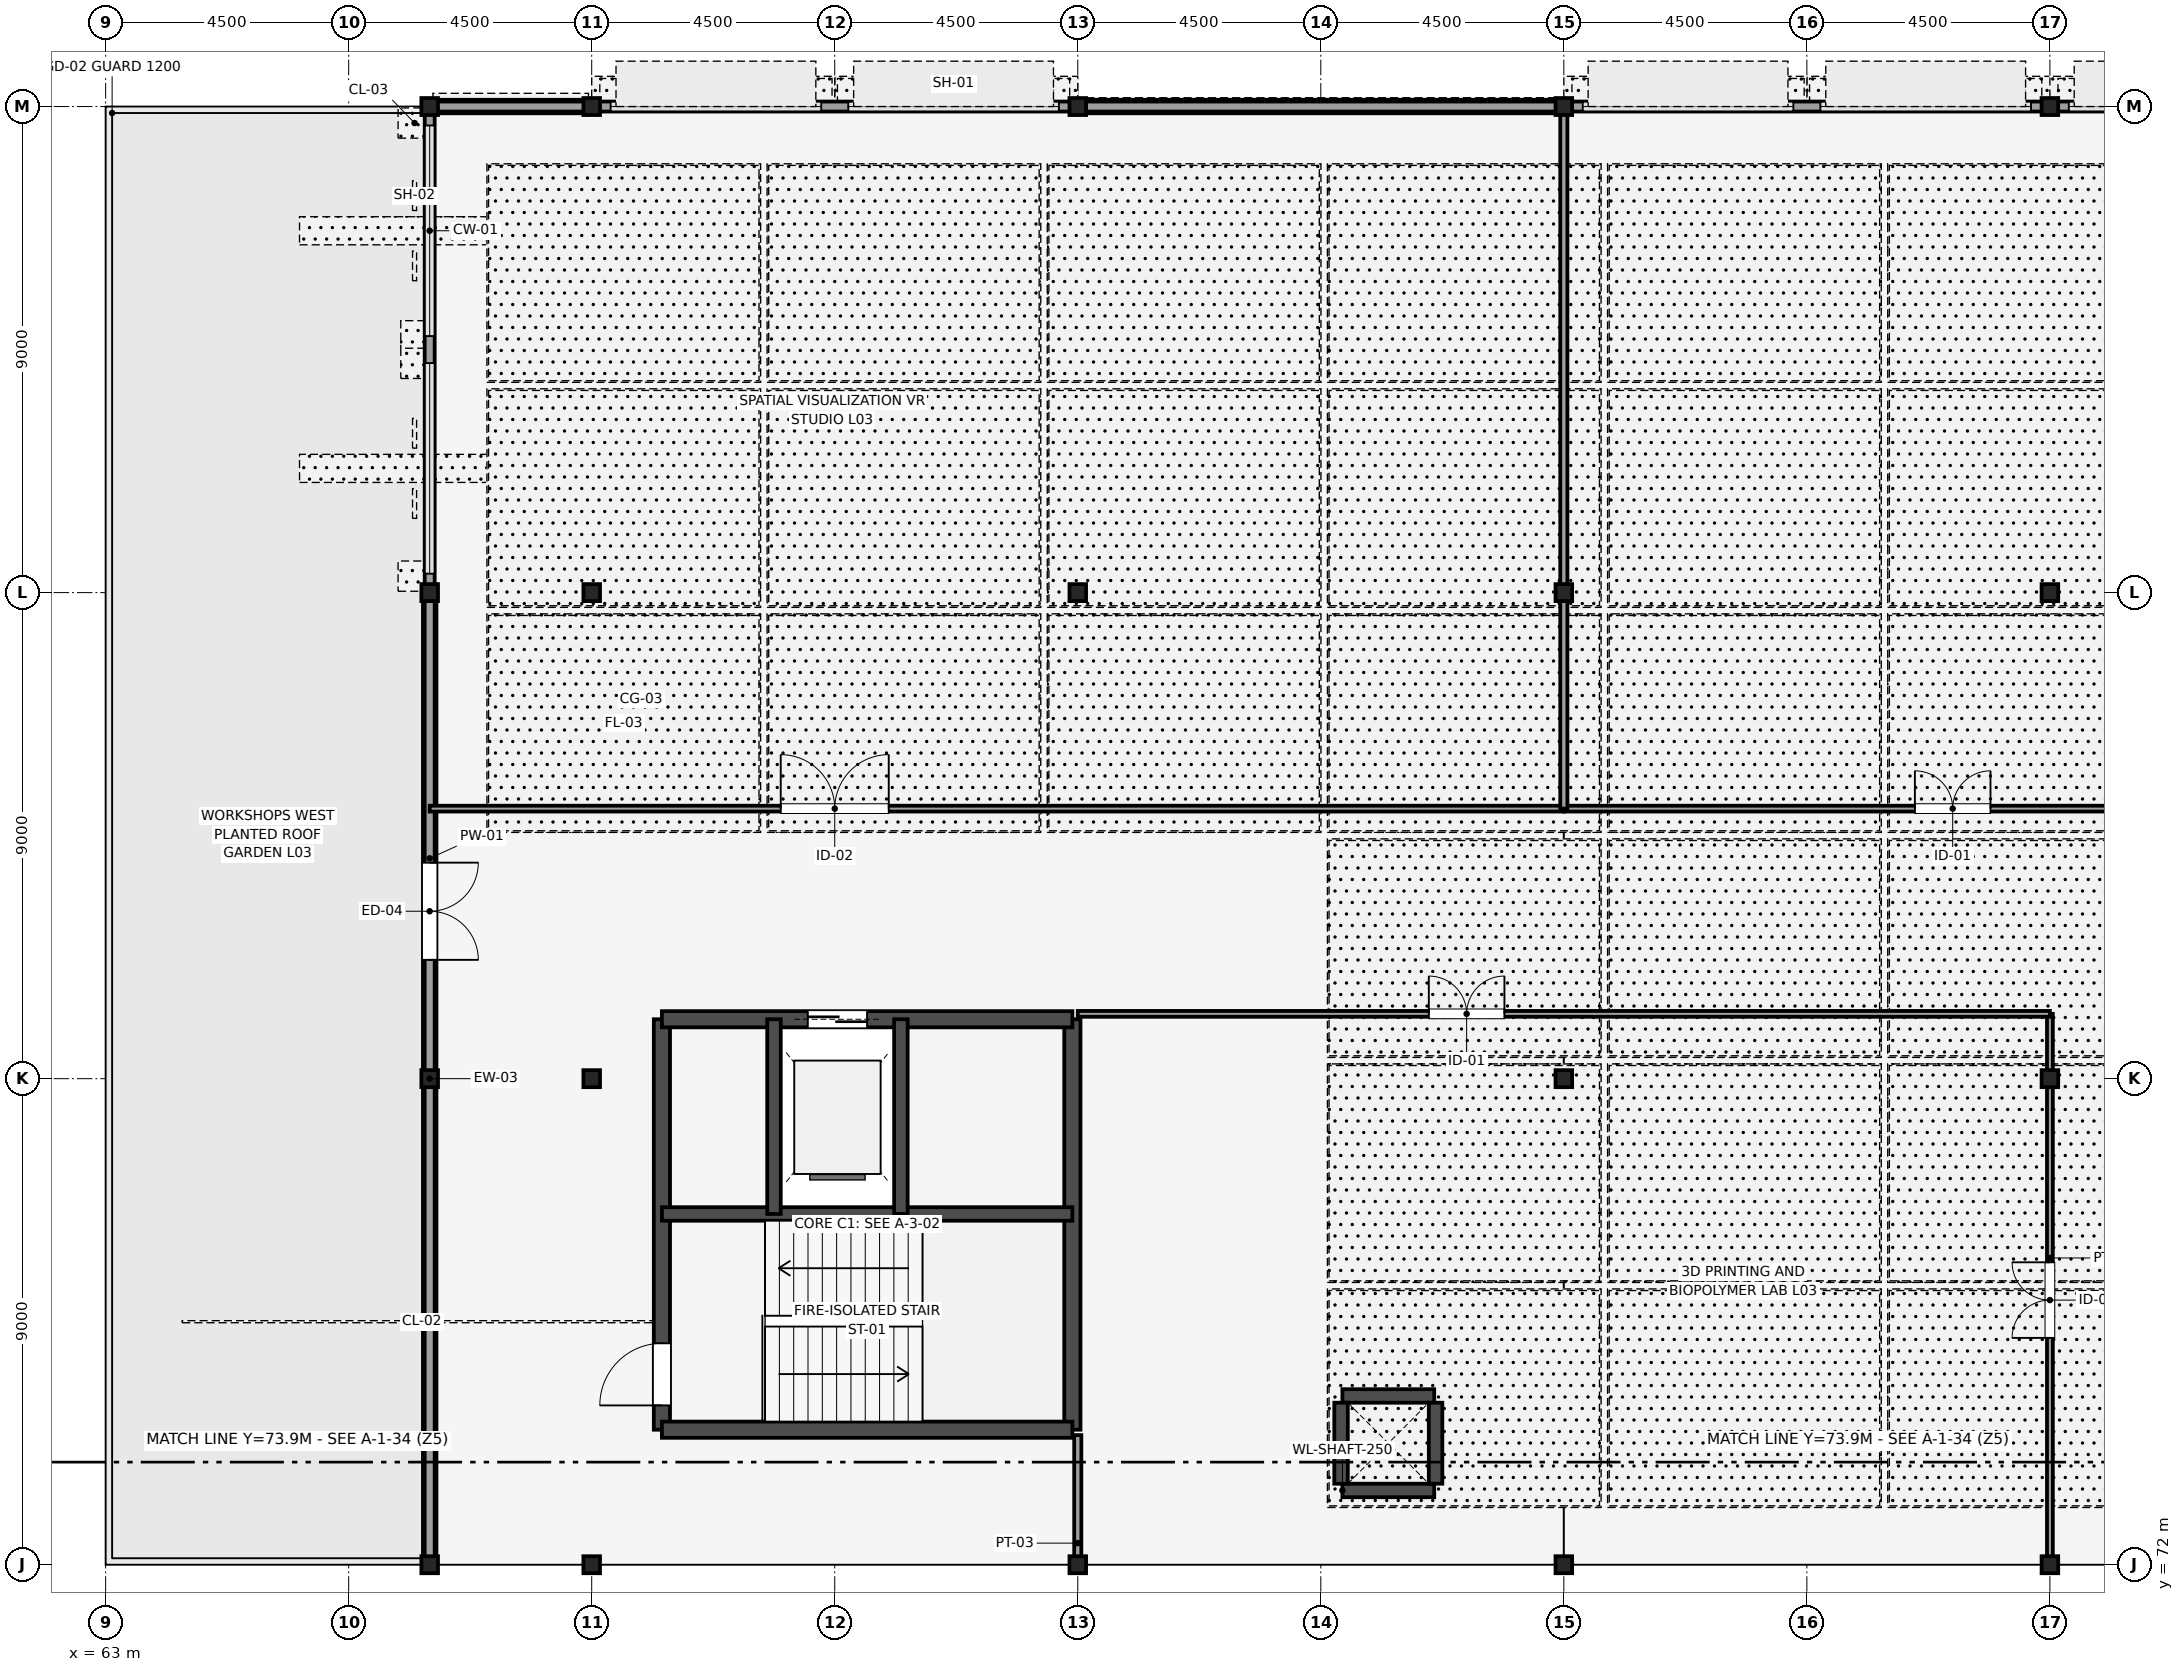
"""IFC4 building model, lengths in metres.
Left out: names, types, materials, properties, quantities, classifications, styles, units other than length and angle.
Written with IfcOpenShell. Run it as: python <this file> out.ifc"""

import sys

from ifc_helpers import new_model, si_unit, direction, frame, frame_2d, origin, origin_2d, place, context, subcontext, project, spatial, rectangle, i_section, extrude, element, fill, save


model = new_model("IFC4")
c1 = context("Model", 3, precision=1e-05, world=origin(), true_north=direction((0.0, 1.0)))
c2 = subcontext(c1, "Body", "Model", "MODEL_VIEW")
j1 = project(units=[si_unit("LENGTHUNIT", "METRE"), si_unit("PLANEANGLEUNIT", "RADIAN")], contexts=[c1])
p1 = place(None, origin())
s1 = spatial("IfcSite", under=j1, at=p1, CompositionType="ELEMENT")
p2 = place(p1, origin())
s2 = spatial("IfcBuilding", under=s1, at=p2, CompositionType="ELEMENT")
p3 = place(p2, frame((0.0, 0.0, 14.4)))
s3 = spatial("IfcBuildingStorey", under=s2, at=p3, CompositionType="ELEMENT", Elevation=14.4)
for number, where, z_axis, x_axis in (
    (1, (69.0, 72.0, 0.0), (0.0, 0.0, 1.0), (1.0, 0.0, 0.0)),
    (2, (69.0, 81.0, 0.0), (0.0, 0.0, 1.0), (1.0, 0.0, 0.0)),
    (3, (69.0, 90.0, 0.0), (0.0, 0.0, 1.0), (1.0, 0.0, 0.0)),
    (4, (69.0, 99.0, 0.0), (0.0, 0.0, 1.0), (1.0, 0.0, 0.0)),
    (5, (72.0, 72.0, 0.0), (0.0, 0.0, 1.0), (1.0, 0.0, 0.0)),
    (6, (72.0, 81.0, 0.0), (0.0, 0.0, 1.0), (1.0, 0.0, 0.0)),
    (7, (72.0, 90.0, 0.0), (0.0, 0.0, 1.0), (1.0, 0.0, 0.0)),
    (8, (72.0, 99.0, 0.0), (0.0, 0.0, 1.0), (1.0, 0.0, 0.0)),
    (9, (81.0, 72.0, 0.0), (0.0, 0.0, 1.0), (1.0, 0.0, 0.0)),
    (10, (81.0, 90.0, 0.0), (0.0, 0.0, 1.0), (1.0, 0.0, 0.0)),
    (11, (81.0, 99.0, 0.0), (0.0, 0.0, 1.0), (1.0, 0.0, 0.0)),
    (12, (90.0, 72.0, 0.0), (0.0, 0.0, 1.0), (1.0, 0.0, 0.0)),
    (13, (90.0, 81.0, 0.0), (0.0, 0.0, 1.0), (1.0, 0.0, 0.0)),
    (14, (90.0, 90.0, 0.0), (0.0, 0.0, 1.0), (1.0, 0.0, 0.0)),
    (15, (90.0, 99.0, 0.0), (0.0, 0.0, 1.0), (1.0, 0.0, 0.0)),
    (16, (99.0, 72.0, 0.0), (0.0, 0.0, 1.0), (1.0, 0.0, 0.0)),
    (17, (99.0, 81.0, 0.0), (0.0, 0.0, 1.0), (1.0, 0.0, 0.0)),
    (18, (99.0, 90.0, 0.0), (0.0, 0.0, 1.0), (1.0, 0.0, 0.0)),
    (19, (99.0, 99.0, 0.0), (0.0, 0.0, 1.0), (1.0, 0.0, 0.0)),
):
    element("IfcColumn", number, at=place(p3, frame(where, z_axis=z_axis, x_axis=x_axis)), inside=s3, PredefinedType="COLUMN", context=c2, shape_type="SweptSolid", body=[
        extrude(i_section(OverallWidth=0.307, OverallDepth=0.315, WebThickness=0.012, FlangeThickness=0.019, FilletRadius=0.017, at=origin_2d()), origin(), (0.0, 0.0, 1.0), 4.5),
    ])
p4 = place(p3, frame((73.3, 74.5, 0.0), z_axis=(0.0, 0.0, 1.0), x_axis=(0.0, 1.0, 0.0)))
e20 = element("IfcWall", 20, at=p4, inside=s3, PredefinedType="SHEAR", context=c2, shape_type="SweptSolid", body=[
    extrude(rectangle(XDim=7.6, YDim=0.3, at=frame_2d((3.8, 0.0))), origin(), (0.0, 0.0, 1.0), 4.34),
])
p5 = place(p4, frame((0.45, 0.0, 0.0)))
e21 = element("IfcOpeningElement", 21, at=p5, cuts=e20, PredefinedType="OPENING", context=c2, shape_type="SweptSolid", body=[
    extrude(rectangle(XDim=1.15, YDim=2.15, at=frame_2d((0.575, 1.075))), frame((0.0, 0.16, 0.0), z_axis=(0.0, -1.0, 0.0), x_axis=(1.0, 0.0, 0.0)), (0.0, 0.0, 1.0), 0.32),
])
p6 = place(p3, frame((80.9, 74.5, 0.0), z_axis=(0.0, 0.0, 1.0), x_axis=(0.0, 1.0, 0.0)))
e22 = element("IfcWall", 22, at=p6, inside=s3, PredefinedType="SHEAR", context=c2, shape_type="SweptSolid", body=[
    extrude(rectangle(XDim=7.6, YDim=0.3, at=frame_2d((3.8, 0.0))), origin(), (0.0, 0.0, 1.0), 4.34),
])
p7 = place(p3, frame((73.3, 74.5, 0.0), z_axis=(0.0, 0.0, 1.0), x_axis=(1.0, 0.0, 0.0)))
e23 = element("IfcWall", 23, at=p7, inside=s3, PredefinedType="SHEAR", context=c2, shape_type="SweptSolid", body=[
    extrude(rectangle(XDim=7.6, YDim=0.3, at=frame_2d((3.8, 0.0))), origin(), (0.0, 0.0, 1.0), 4.34),
])
p8 = place(p3, frame((73.3, 82.1, 0.0), z_axis=(0.0, 0.0, 1.0), x_axis=(1.0, 0.0, 0.0)))
e24 = element("IfcWall", 24, at=p8, inside=s3, PredefinedType="SHEAR", context=c2, shape_type="SweptSolid", body=[
    extrude(rectangle(XDim=7.6, YDim=0.3, at=frame_2d((3.8, 0.0))), origin(), (0.0, 0.0, 1.0), 4.34),
])
p9 = place(p8, frame((2.7, 0.0, 0.0)))
e25 = element("IfcOpeningElement", 25, at=p9, cuts=e24, PredefinedType="OPENING", context=c2, shape_type="SweptSolid", body=[
    extrude(rectangle(XDim=1.1, YDim=2.2, at=frame_2d((0.55, 1.1))), frame((0.0, 0.16, 0.0), z_axis=(0.0, -1.0, 0.0), x_axis=(1.0, 0.0, 0.0)), (0.0, 0.0, 1.0), 0.32),
])
p10 = place(p3, frame((73.3, 78.495, 0.0), z_axis=(0.0, 0.0, 1.0), x_axis=(1.0, 0.0, 0.0)))
e26 = element("IfcWall", 26, at=p10, inside=s3, PredefinedType="SHEAR", context=c2, shape_type="SweptSolid", body=[
    extrude(rectangle(XDim=7.6, YDim=0.25, at=frame_2d((3.8, 0.0))), origin(), (0.0, 0.0, 1.0), 4.34),
])
for number, where, z_axis, x_axis in (
    (27, (75.375, 78.495, 0.0), (0.0, 0.0, 1.0), (0.0, 1.0, 0.0)),
    (28, (77.725, 78.495, 0.0), (0.0, 0.0, 1.0), (0.0, 1.0, 0.0)),
):
    element("IfcWall", number, at=place(p3, frame(where, z_axis=z_axis, x_axis=x_axis)), inside=s3, PredefinedType="SHEAR", context=c2, shape_type="SweptSolid", body=[
        extrude(rectangle(XDim=3.605, YDim=0.25, at=frame_2d((1.802, 0.0))), origin(), (0.0, 0.0, 1.0), 4.34),
    ])
for number, where, z_axis, x_axis in (
    (29, (85.9, 73.375, 0.0), (0.0, 0.0, 1.0), (1.0, 0.0, 0.0)),
    (30, (85.9, 75.125, 0.0), (0.0, 0.0, 1.0), (1.0, 0.0, 0.0)),
):
    element("IfcWall", number, at=place(p3, frame(where, z_axis=z_axis, x_axis=x_axis)), inside=s3, PredefinedType="SHEAR", context=c2, shape_type="SweptSolid", body=[
        extrude(rectangle(XDim=1.7, YDim=0.25, at=frame_2d((0.85, 0.0))), origin(), (0.0, 0.0, 1.0), 3.77),
    ])
for number, where, z_axis, x_axis in (
    (31, (85.875, 73.5, 0.0), (0.0, 0.0, 1.0), (0.0, 1.0, 0.0)),
    (32, (87.625, 73.5, 0.0), (0.0, 0.0, 1.0), (0.0, 1.0, 0.0)),
):
    element("IfcWall", number, at=place(p3, frame(where, z_axis=z_axis, x_axis=x_axis)), inside=s3, PredefinedType="SHEAR", context=c2, shape_type="SweptSolid", body=[
        extrude(rectangle(XDim=1.5, YDim=0.25, at=frame_2d((0.75, 0.0))), origin(), (0.0, 0.0, 1.0), 3.77),
    ])
p11 = place(p3, frame((69.0, 72.0, 0.0), z_axis=(0.0, 0.0, 1.0), x_axis=(1.0, 0.0, 0.0)))
e33 = element("IfcWall", 33, at=p11, inside=s3, PredefinedType="STANDARD", context=c2, shape_type="SweptSolid", body=[
    extrude(rectangle(XDim=3.0, YDim=0.25, at=frame_2d((1.5, 0.0))), origin(), (0.0, 0.0, 1.0), 3.846),
])
p12 = place(p3, frame((99.0, 72.0, 0.0), z_axis=(0.0, 0.0, 1.0), x_axis=(1.0, 0.0, 0.0)))
e34 = element("IfcWall", 34, at=p12, inside=s3, PredefinedType="STANDARD", context=c2, shape_type="SweptSolid", body=[
    extrude(rectangle(XDim=9.0, YDim=0.25, at=frame_2d((4.5, 0.0))), origin(), (0.0, 0.0, 1.0), 3.846),
])
p13 = place(p12, frame((3.6, 0.0, 0.0)))
e35 = element("IfcOpeningElement", 35, at=p13, cuts=e34, PredefinedType="OPENING", context=c2, shape_type="SweptSolid", body=[
    extrude(rectangle(XDim=1.8, YDim=2.3, at=frame_2d((0.9, 1.15))), frame((0.0, 0.135, 0.0), z_axis=(0.0, -1.0, 0.0), x_axis=(1.0, 0.0, 0.0)), (0.0, 0.0, 1.0), 0.27),
])
p14 = place(p3, frame((69.0, 81.0, 0.0), z_axis=(0.0, 0.0, 1.0), x_axis=(0.0, -1.0, 0.0)))
e36 = element("IfcWall", 36, at=p14, inside=s3, PredefinedType="STANDARD", context=c2, shape_type="SweptSolid", body=[
    extrude(rectangle(XDim=9.0, YDim=0.25, at=frame_2d((4.5, 0.0))), origin(), (0.0, 0.0, 1.0), 3.772),
])
p15 = place(p3, frame((69.0, 90.0, 0.0), z_axis=(0.0, 0.0, 1.0), x_axis=(0.0, -1.0, 0.0)))
e37 = element("IfcWall", 37, at=p15, inside=s3, PredefinedType="STANDARD", context=c2, shape_type="SweptSolid", body=[
    extrude(rectangle(XDim=9.0, YDim=0.25, at=frame_2d((4.5, 0.0))), origin(), (0.0, 0.0, 1.0), 3.772),
])
p16 = place(p15, frame((5.0, 0.0, 0.0)))
e38 = element("IfcOpeningElement", 38, at=p16, cuts=e37, PredefinedType="OPENING", context=c2, shape_type="SweptSolid", body=[
    extrude(rectangle(XDim=1.8, YDim=2.3, at=frame_2d((0.9, 1.15))), frame((0.0, 0.135, 0.0), z_axis=(0.0, -1.0, 0.0), x_axis=(1.0, 0.0, 0.0)), (0.0, 0.0, 1.0), 0.27),
])
p17 = place(p3, frame((72.0, 99.0, 0.0), z_axis=(0.0, 0.0, 1.0), x_axis=(-1.0, 0.0, 0.0)))
e39 = element("IfcWall", 39, at=p17, inside=s3, PredefinedType="STANDARD", context=c2, shape_type="SweptSolid", body=[
    extrude(rectangle(XDim=3.0, YDim=0.25, at=frame_2d((1.5, 0.0))), origin(), (0.0, 0.0, 1.0), 3.894),
])
p18 = place(p3, frame((90.0, 99.0, 0.0), z_axis=(0.0, 0.0, 1.0), x_axis=(-1.0, 0.0, 0.0)))
e40 = element("IfcWall", 40, at=p18, inside=s3, PredefinedType="STANDARD", context=c2, shape_type="SweptSolid", body=[
    extrude(rectangle(XDim=9.0, YDim=0.25, at=frame_2d((4.5, 0.0))), origin(), (0.0, 0.0, 1.0), 3.767),
])
p19 = place(p3, frame((69.0, 72.0, 4.5), z_axis=(0.0, 0.0, 1.0), x_axis=(0.0, 1.0, 0.0)))
e41 = element("IfcWall", 41, at=p19, inside=s3, PredefinedType="PARAPET", context=c2, shape_type="SweptSolid", body=[
    extrude(rectangle(XDim=27.0, YDim=0.185, at=frame_2d((13.5, 0.0))), origin(), (0.0, 0.0, 1.0), 1.0),
])
for number, where, z_axis, x_axis in (
    (42, (69.0, 99.0, 4.5), (0.0, 0.0, 1.0), (1.0, 0.0, 0.0)),
    (43, (69.0, 72.0, 4.5), (0.0, 0.0, 1.0), (1.0, 0.0, 0.0)),
):
    element("IfcWall", number, at=place(p3, frame(where, z_axis=z_axis, x_axis=x_axis)), inside=s3, PredefinedType="PARAPET", context=c2, shape_type="SweptSolid", body=[
        extrude(rectangle(XDim=43.5, YDim=0.185, at=frame_2d((21.75, 0.0))), origin(), (0.0, 0.0, 1.0), 1.0),
    ])
p20 = place(p3, frame((81.0, 72.0, 0.0), z_axis=(0.0, 0.0, 1.0), x_axis=(0.0, 1.0, 0.0)))
e44 = element("IfcWall", 44, at=p20, inside=s3, PredefinedType="PARTITIONING", context=c2, shape_type="SweptSolid", body=[
    extrude(rectangle(XDim=2.4, YDim=0.132, at=frame_2d((1.2, 0.0))), origin(), (0.0, 0.0, 1.0), 3.6),
])
p21 = place(p3, frame((99.0, 72.0, 0.0), z_axis=(0.0, 0.0, 1.0), x_axis=(0.0, 1.0, 0.0)))
e45 = element("IfcWall", 45, at=p21, inside=s3, PredefinedType="PARTITIONING", context=c2, shape_type="SweptSolid", body=[
    extrude(rectangle(XDim=10.2, YDim=0.108, at=frame_2d((5.1, 0.0))), origin(), (0.0, 0.0, 1.0), 3.772),
])
p22 = place(p21, frame((4.2, 0.0, 0.0)))
e46 = element("IfcOpeningElement", 46, at=p22, cuts=e45, PredefinedType="OPENING", context=c2, shape_type="SweptSolid", body=[
    extrude(rectangle(XDim=1.4, YDim=2.2, at=frame_2d((0.7, 1.1))), frame((0.0, 0.064, 0.0), z_axis=(0.0, -1.0, 0.0), x_axis=(1.0, 0.0, 0.0)), (0.0, 0.0, 1.0), 0.128),
])
p23 = place(p3, frame((81.0, 82.2, 0.0), z_axis=(0.0, 0.0, 1.0), x_axis=(1.0, 0.0, 0.0)))
e47 = element("IfcWall", 47, at=p23, inside=s3, PredefinedType="PARTITIONING", context=c2, shape_type="SweptSolid", body=[
    extrude(rectangle(XDim=18.0, YDim=0.108, at=frame_2d((9.0, 0.0))), origin(), (0.0, 0.0, 1.0), 4.32),
])
p24 = place(p23, frame((6.5, 0.0, 0.0)))
e48 = element("IfcOpeningElement", 48, at=p24, cuts=e47, PredefinedType="OPENING", context=c2, shape_type="SweptSolid", body=[
    extrude(rectangle(XDim=1.4, YDim=2.2, at=frame_2d((0.7, 1.1))), frame((0.0, 0.064, 0.0), z_axis=(0.0, -1.0, 0.0), x_axis=(1.0, 0.0, 0.0)), (0.0, 0.0, 1.0), 0.128),
])
p25 = place(p3, frame((69.0, 86.0, 0.0), z_axis=(0.0, 0.0, 1.0), x_axis=(1.0, 0.0, 0.0)))
e49 = element("IfcWall", 49, at=p25, inside=s3, PredefinedType="PARTITIONING", context=c2, shape_type="SweptSolid", body=[
    extrude(rectangle(XDim=21.0, YDim=0.108, at=frame_2d((10.5, 0.0))), origin(), (0.0, 0.0, 1.0), 4.32),
])
p26 = place(p25, frame((6.5, 0.0, 0.0)))
e50 = element("IfcOpeningElement", 50, at=p26, cuts=e49, PredefinedType="OPENING", context=c2, shape_type="SweptSolid", body=[
    extrude(rectangle(XDim=2.0, YDim=2.4, at=frame_2d((1.0, 1.2))), frame((0.0, 0.064, 0.0), z_axis=(0.0, -1.0, 0.0), x_axis=(1.0, 0.0, 0.0)), (0.0, 0.0, 1.0), 0.128),
])
p27 = place(p3, frame((90.0, 86.0, 0.0), z_axis=(0.0, 0.0, 1.0), x_axis=(1.0, 0.0, 0.0)))
e51 = element("IfcWall", 51, at=p27, inside=s3, PredefinedType="PARTITIONING", context=c2, shape_type="SweptSolid", body=[
    extrude(rectangle(XDim=22.5, YDim=0.108, at=frame_2d((11.25, 0.0))), origin(), (0.0, 0.0, 1.0), 4.32),
])
p28 = place(p27, frame((6.5, 0.0, 0.0)))
e52 = element("IfcOpeningElement", 52, at=p28, cuts=e51, PredefinedType="OPENING", context=c2, shape_type="SweptSolid", body=[
    extrude(rectangle(XDim=1.4, YDim=2.2, at=frame_2d((0.7, 1.1))), frame((0.0, 0.064, 0.0), z_axis=(0.0, -1.0, 0.0), x_axis=(1.0, 0.0, 0.0)), (0.0, 0.0, 1.0), 0.128),
])
p29 = place(p3, frame((90.0, 86.0, 0.0), z_axis=(0.0, 0.0, 1.0), x_axis=(0.0, 1.0, 0.0)))
e53 = element("IfcWall", 53, at=p29, inside=s3, PredefinedType="PARTITIONING", context=c2, shape_type="SweptSolid", body=[
    extrude(rectangle(XDim=13.0, YDim=0.132, at=frame_2d((6.5, 0.0))), origin(), (0.0, 0.0, 1.0), 3.772),
])
p30 = place(p16, origin())
e54 = element("IfcDoor", 54, at=p30, inside=s3, OperationType="DOUBLE_DOOR_SINGLE_SWING", PredefinedType="DOOR", context=c2, shape_type="SweptSolid", body=[
    extrude(rectangle(XDim=1.8, YDim=2.3, at=frame_2d((0.9, 1.15))), frame((0.0, 0.025, 0.0), z_axis=(0.0, -1.0, 0.0), x_axis=(1.0, 0.0, 0.0)), (0.0, 0.0, 1.0), 0.05),
])
fill(e38, e54)
p31 = place(p5, origin())
e55 = element("IfcDoor", 55, at=p31, inside=s3, OperationType="SINGLE_SWING_LEFT", PredefinedType="DOOR", context=c2, shape_type="SweptSolid", body=[
    extrude(rectangle(XDim=1.15, YDim=2.15, at=frame_2d((0.575, 1.075))), frame((0.0, 0.025, 0.0), z_axis=(0.0, -1.0, 0.0), x_axis=(1.0, 0.0, 0.0)), (0.0, 0.0, 1.0), 0.05),
])
fill(e21, e55)
p32 = place(p9, origin())
e56 = element("IfcDoor", 56, at=p32, inside=s3, OperationType="DOUBLE_DOOR_SLIDING", PredefinedType="DOOR", context=c2, shape_type="SweptSolid", body=[
    extrude(rectangle(XDim=1.1, YDim=2.2, at=frame_2d((0.55, 1.1))), frame((0.0, 0.025, 0.0), z_axis=(0.0, -1.0, 0.0), x_axis=(1.0, 0.0, 0.0)), (0.0, 0.0, 1.0), 0.05),
])
fill(e25, e56)
p33 = place(p22, origin())
e57 = element("IfcDoor", 57, at=p33, inside=s3, OperationType="DOUBLE_DOOR_SINGLE_SWING", PredefinedType="DOOR", context=c2, shape_type="SweptSolid", body=[
    extrude(rectangle(XDim=1.4, YDim=2.2, at=frame_2d((0.7, 1.1))), frame((0.0, 0.025, 0.0), z_axis=(0.0, -1.0, 0.0), x_axis=(1.0, 0.0, 0.0)), (0.0, 0.0, 1.0), 0.05),
])
fill(e46, e57)
p34 = place(p24, origin())
e58 = element("IfcDoor", 58, at=p34, inside=s3, OperationType="DOUBLE_DOOR_SINGLE_SWING", PredefinedType="DOOR", context=c2, shape_type="SweptSolid", body=[
    extrude(rectangle(XDim=1.4, YDim=2.2, at=frame_2d((0.7, 1.1))), frame((0.0, 0.025, 0.0), z_axis=(0.0, -1.0, 0.0), x_axis=(1.0, 0.0, 0.0)), (0.0, 0.0, 1.0), 0.05),
])
fill(e48, e58)
p35 = place(p26, origin())
e59 = element("IfcDoor", 59, at=p35, inside=s3, OperationType="DOUBLE_DOOR_DOUBLE_SWING", PredefinedType="DOOR", context=c2, shape_type="SweptSolid", body=[
    extrude(rectangle(XDim=2.0, YDim=2.4, at=frame_2d((1.0, 1.2))), frame((0.0, 0.025, 0.0), z_axis=(0.0, -1.0, 0.0), x_axis=(1.0, 0.0, 0.0)), (0.0, 0.0, 1.0), 0.05),
])
fill(e50, e59)
p36 = place(p28, origin())
e60 = element("IfcDoor", 60, at=p36, inside=s3, OperationType="DOUBLE_DOOR_SINGLE_SWING", PredefinedType="DOOR", context=c2, shape_type="SweptSolid", body=[
    extrude(rectangle(XDim=1.4, YDim=2.2, at=frame_2d((0.7, 1.1))), frame((0.0, 0.025, 0.0), z_axis=(0.0, -1.0, 0.0), x_axis=(1.0, 0.0, 0.0)), (0.0, 0.0, 1.0), 0.05),
])
fill(e52, e60)
save(model, sys.argv[1])
